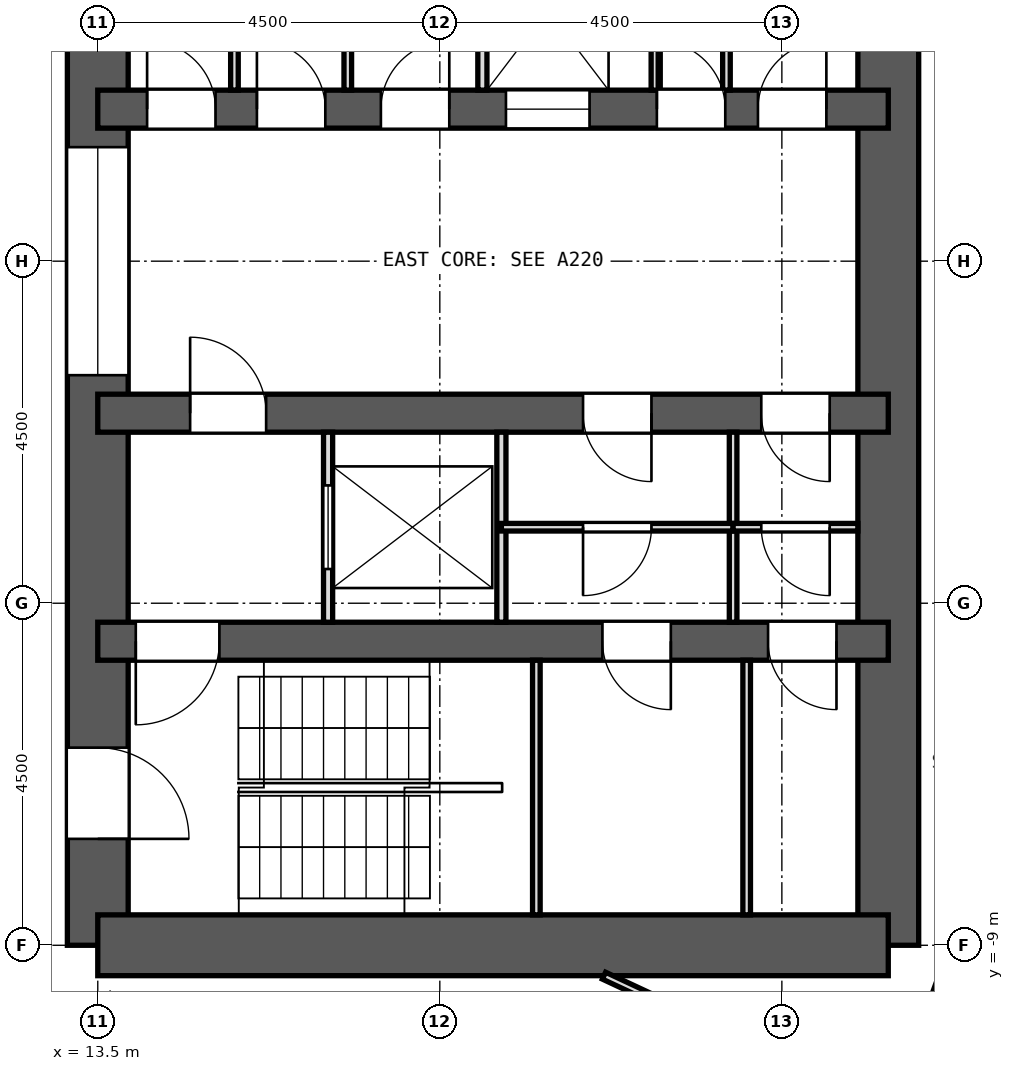
"""IFC4 building model, lengths in metres.
Left out: names, types, materials, properties, quantities, classifications, styles, units other than length and angle.
Written with IfcOpenShell. Run it as: python <this file> out.ifc"""

import sys

from ifc_helpers import new_model, si_unit, direction, frame, frame_2d, origin, place, context, subcontext, project, spatial, rectangle, extrude, element, fill, save


model = new_model("IFC4")
c1 = context("Model", 3, precision=1e-05, world=origin(), true_north=direction((0.0, 1.0)))
c2 = subcontext(c1, "Body", "Model", "MODEL_VIEW")
j1 = project(units=[si_unit("LENGTHUNIT", "METRE"), si_unit("PLANEANGLEUNIT", "RADIAN")], contexts=[c1])
p1 = place(None, origin())
s1 = spatial("IfcSite", under=j1, at=p1, CompositionType="ELEMENT")
p2 = place(p1, origin())
s2 = spatial("IfcBuilding", under=s1, at=p2, CompositionType="ELEMENT")
p3 = place(p2, frame((0.0, 0.0, 121.6)))
s3 = spatial("IfcBuildingStorey", under=s2, at=p3, CompositionType="ELEMENT", Elevation=121.6)
p4 = place(p3, frame((13.5, -9.0, 0.0), z_axis=(0.0, 0.0, 1.0), x_axis=(0.0, 1.0, 0.0)))
e1 = element("IfcWall", 1, at=p4, inside=s3, PredefinedType="SHEAR", context=c2, shape_type="SweptSolid", body=[
    extrude(rectangle(XDim=18.0, YDim=0.8, at=frame_2d((9.0, 0.0))), origin(), (0.0, 0.0, 1.0), 3.3),
])
p5 = place(p4, frame((15.4, 0.0, 0.0)))
e2 = element("IfcOpeningElement", 2, at=p5, cuts=e1, PredefinedType="OPENING", context=c2, shape_type="SweptSolid", body=[
    extrude(rectangle(XDim=1.2, YDim=2.1, at=frame_2d((0.6, 1.05))), frame((0.0, 0.412, 0.0), z_axis=(0.0, -1.0, 0.0), x_axis=(1.0, 0.0, 0.0)), (0.0, 0.0, 1.0), 0.824),
])
p6 = place(p4, frame((1.4, 0.0, 0.0)))
e3 = element("IfcOpeningElement", 3, at=p6, cuts=e1, PredefinedType="OPENING", context=c2, shape_type="SweptSolid", body=[
    extrude(rectangle(XDim=1.2, YDim=2.1, at=frame_2d((0.6, 1.05))), frame((0.0, 0.412, 0.0), z_axis=(0.0, -1.0, 0.0), x_axis=(1.0, 0.0, 0.0)), (0.0, 0.0, 1.0), 0.824),
])
p7 = place(p4, frame((7.5, 0.0, 0.0)))
e4 = element("IfcOpeningElement", 4, at=p7, cuts=e1, PredefinedType="OPENING", context=c2, shape_type="SweptSolid", body=[
    extrude(rectangle(XDim=3.0, YDim=2.4, at=frame_2d((1.5, 1.2))), frame((0.0, 0.412, 0.0), z_axis=(0.0, -1.0, 0.0), x_axis=(1.0, 0.0, 0.0)), (0.0, 0.0, 1.0), 0.824),
])
p8 = place(p3, frame((23.9, -9.0, 0.0), z_axis=(0.0, 0.0, 1.0), x_axis=(0.0, 1.0, 0.0)))
e5 = element("IfcWall", 5, at=p8, inside=s3, PredefinedType="SHEAR", context=c2, shape_type="SweptSolid", body=[
    extrude(rectangle(XDim=18.0, YDim=0.8, at=frame_2d((9.0, 0.0))), origin(), (0.0, 0.0, 1.0), 3.3),
])
p9 = place(p3, frame((13.5, -9.0, 0.0), z_axis=(0.0, 0.0, 1.0), x_axis=(1.0, 0.0, 0.0)))
e6 = element("IfcWall", 6, at=p9, inside=s3, PredefinedType="SHEAR", context=c2, shape_type="SweptSolid", body=[
    extrude(rectangle(XDim=10.4, YDim=0.8, at=frame_2d((5.2, 0.0))), origin(), (0.0, 0.0, 1.0), 3.3),
])
p10 = place(p3, frame((13.5, -5.0, 0.0), z_axis=(0.0, 0.0, 1.0), x_axis=(1.0, 0.0, 0.0)))
e7 = element("IfcWall", 7, at=p10, inside=s3, PredefinedType="SHEAR", context=c2, shape_type="SweptSolid", body=[
    extrude(rectangle(XDim=10.4, YDim=0.5, at=frame_2d((5.2, 0.0))), origin(), (0.0, 0.0, 1.0), 3.3),
])
p11 = place(p10, frame((6.639, 0.0, 0.0)))
e8 = element("IfcOpeningElement", 8, at=p11, cuts=e7, PredefinedType="OPENING", context=c2, shape_type="SweptSolid", body=[
    extrude(rectangle(XDim=0.9, YDim=2.1, at=frame_2d((0.45, 1.05))), frame((0.0, 0.262, 0.0), z_axis=(0.0, -1.0, 0.0), x_axis=(1.0, 0.0, 0.0)), (0.0, 0.0, 1.0), 0.524),
])
p12 = place(p10, frame((8.819, 0.0, 0.0)))
e9 = element("IfcOpeningElement", 9, at=p12, cuts=e7, PredefinedType="OPENING", context=c2, shape_type="SweptSolid", body=[
    extrude(rectangle(XDim=0.9, YDim=2.1, at=frame_2d((0.45, 1.05))), frame((0.0, 0.262, 0.0), z_axis=(0.0, -1.0, 0.0), x_axis=(1.0, 0.0, 0.0)), (0.0, 0.0, 1.0), 0.524),
])
p13 = place(p10, frame((0.5, 0.0, 0.0)))
e10 = element("IfcOpeningElement", 10, at=p13, cuts=e7, PredefinedType="OPENING", context=c2, shape_type="SweptSolid", body=[
    extrude(rectangle(XDim=1.1, YDim=2.1, at=frame_2d((0.55, 1.05))), frame((0.0, 0.262, 0.0), z_axis=(0.0, -1.0, 0.0), x_axis=(1.0, 0.0, 0.0)), (0.0, 0.0, 1.0), 0.524),
])
p14 = place(p3, frame((13.5, 2.0, 0.0), z_axis=(0.0, 0.0, 1.0), x_axis=(1.0, 0.0, 0.0)))
e11 = element("IfcWall", 11, at=p14, inside=s3, PredefinedType="SHEAR", context=c2, shape_type="SweptSolid", body=[
    extrude(rectangle(XDim=10.4, YDim=0.5, at=frame_2d((5.2, 0.0))), origin(), (0.0, 0.0, 1.0), 3.3),
])
p15 = place(p14, frame((5.37, 0.0, 0.0)))
e12 = element("IfcOpeningElement", 12, at=p15, cuts=e11, PredefinedType="OPENING", context=c2, shape_type="SweptSolid", body=[
    extrude(rectangle(XDim=1.1, YDim=2.1, at=frame_2d((0.55, 1.05))), frame((0.0, 0.262, 0.0), z_axis=(0.0, -1.0, 0.0), x_axis=(1.0, 0.0, 0.0)), (0.0, 0.0, 1.0), 0.524),
])
p16 = place(p14, frame((0.649, 0.0, 0.0)))
e13 = element("IfcOpeningElement", 13, at=p16, cuts=e11, PredefinedType="OPENING", context=c2, shape_type="SweptSolid", body=[
    extrude(rectangle(XDim=0.9, YDim=2.1, at=frame_2d((0.45, 1.05))), frame((0.0, 0.262, 0.0), z_axis=(0.0, -1.0, 0.0), x_axis=(1.0, 0.0, 0.0)), (0.0, 0.0, 1.0), 0.524),
])
p17 = place(p14, frame((2.094, 0.0, 0.0)))
e14 = element("IfcOpeningElement", 14, at=p17, cuts=e11, PredefinedType="OPENING", context=c2, shape_type="SweptSolid", body=[
    extrude(rectangle(XDim=0.9, YDim=2.1, at=frame_2d((0.45, 1.05))), frame((0.0, 0.262, 0.0), z_axis=(0.0, -1.0, 0.0), x_axis=(1.0, 0.0, 0.0)), (0.0, 0.0, 1.0), 0.524),
])
p18 = place(p14, frame((3.725, 0.0, 0.0)))
e15 = element("IfcOpeningElement", 15, at=p18, cuts=e11, PredefinedType="OPENING", context=c2, shape_type="SweptSolid", body=[
    extrude(rectangle(XDim=0.9, YDim=2.1, at=frame_2d((0.45, 1.05))), frame((0.0, 0.262, 0.0), z_axis=(0.0, -1.0, 0.0), x_axis=(1.0, 0.0, 0.0)), (0.0, 0.0, 1.0), 0.524),
])
p19 = place(p14, frame((7.355, 0.0, 0.0)))
e16 = element("IfcOpeningElement", 16, at=p19, cuts=e11, PredefinedType="OPENING", context=c2, shape_type="SweptSolid", body=[
    extrude(rectangle(XDim=0.9, YDim=2.1, at=frame_2d((0.45, 1.05))), frame((0.0, 0.262, 0.0), z_axis=(0.0, -1.0, 0.0), x_axis=(1.0, 0.0, 0.0)), (0.0, 0.0, 1.0), 0.524),
])
p20 = place(p14, frame((8.686, 0.0, 0.0)))
e17 = element("IfcOpeningElement", 17, at=p20, cuts=e11, PredefinedType="OPENING", context=c2, shape_type="SweptSolid", body=[
    extrude(rectangle(XDim=0.9, YDim=2.1, at=frame_2d((0.45, 1.05))), frame((0.0, 0.262, 0.0), z_axis=(0.0, -1.0, 0.0), x_axis=(1.0, 0.0, 0.0)), (0.0, 0.0, 1.0), 0.524),
])
p21 = place(p3, frame((13.5, -2.0, 0.0), z_axis=(0.0, 0.0, 1.0), x_axis=(1.0, 0.0, 0.0)))
e18 = element("IfcWall", 18, at=p21, inside=s3, PredefinedType="SHEAR", context=c2, shape_type="SweptSolid", body=[
    extrude(rectangle(XDim=10.4, YDim=0.5, at=frame_2d((5.2, 0.0))), origin(), (0.0, 0.0, 1.0), 3.3),
])
p22 = place(p21, frame((1.215, 0.0, 0.0)))
e19 = element("IfcOpeningElement", 19, at=p22, cuts=e18, PredefinedType="OPENING", context=c2, shape_type="SweptSolid", body=[
    extrude(rectangle(XDim=1.0, YDim=2.1, at=frame_2d((0.5, 1.05))), frame((0.0, 0.262, 0.0), z_axis=(0.0, -1.0, 0.0), x_axis=(1.0, 0.0, 0.0)), (0.0, 0.0, 1.0), 0.524),
])
p23 = place(p21, frame((6.384, 0.0, 0.0)))
e20 = element("IfcOpeningElement", 20, at=p23, cuts=e18, PredefinedType="OPENING", context=c2, shape_type="SweptSolid", body=[
    extrude(rectangle(XDim=0.9, YDim=2.1, at=frame_2d((0.45, 1.05))), frame((0.0, 0.262, 0.0), z_axis=(0.0, -1.0, 0.0), x_axis=(1.0, 0.0, 0.0)), (0.0, 0.0, 1.0), 0.524),
])
p24 = place(p21, frame((8.729, 0.0, 0.0)))
e21 = element("IfcOpeningElement", 21, at=p24, cuts=e18, PredefinedType="OPENING", context=c2, shape_type="SweptSolid", body=[
    extrude(rectangle(XDim=0.9, YDim=2.1, at=frame_2d((0.45, 1.05))), frame((0.0, 0.262, 0.0), z_axis=(0.0, -1.0, 0.0), x_axis=(1.0, 0.0, 0.0)), (0.0, 0.0, 1.0), 0.524),
])
p25 = place(p3, frame((24.369, -10.811, 0.0), z_axis=(0.0, 0.0, 1.0), x_axis=(0.341990236633, 0.939703505393, 0.0)))
e22 = element("IfcWall", 22, at=p25, inside=s3, PredefinedType="SOLIDWALL", context=c2, shape_type="SweptSolid", body=[
    extrude(rectangle(XDim=3.648, YDim=0.6, at=frame_2d((1.824, 0.0))), origin(), (0.0, 0.0, 1.0), 2.8),
])
p26 = place(p3, frame((20.16, -9.4, 0.0), z_axis=(0.0, 0.0, 1.0), x_axis=(0.906121146584, -0.423018282954, 0.0)))
e23 = element("IfcWall", 23, at=p26, inside=s3, PredefinedType="PARTITIONING", context=c2, shape_type="SweptSolid", body=[
    extrude(rectangle(XDim=3.421, YDim=0.1, at=frame_2d((1.711, 0.0))), origin(), (0.0, 0.0, 1.0), 2.8),
])
for number, where, z_axis, x_axis in (
    (24, (15.298, 2.25, 0.0), (0.0, 0.0, 1.0), (0.0, 1.0, 0.0)),
    (25, (16.789, 2.25, 0.0), (0.0, 0.0, 1.0), (0.0, 1.0, 0.0)),
):
    element("IfcWall", number, at=place(p3, frame(where, z_axis=z_axis, x_axis=x_axis)), inside=s3, PredefinedType="PARTITIONING", context=c2, shape_type="SweptSolid", body=[
        extrude(rectangle(XDim=2.5, YDim=0.1, at=frame_2d((1.25, 0.0))), origin(), (0.0, 0.0, 1.0), 2.8),
    ])
for number, where, z_axis, x_axis in (
    (26, (18.56, 2.25, 0.0), (0.0, 0.0, 1.0), (0.0, 1.0, 0.0)),
    (27, (20.84, 2.25, 0.0), (0.0, 0.0, 1.0), (0.0, 1.0, 0.0)),
):
    element("IfcWall", number, at=place(p3, frame(where, z_axis=z_axis, x_axis=x_axis)), inside=s3, PredefinedType="PARTITIONING", context=c2, shape_type="SweptSolid", body=[
        extrude(rectangle(XDim=2.5, YDim=0.12, at=frame_2d((1.25, 0.0))), origin(), (0.0, 0.0, 1.0), 2.8),
    ])
p27 = place(p3, frame((21.771, 2.25, 0.0), z_axis=(0.0, 0.0, 1.0), x_axis=(0.0, 1.0, 0.0)))
e28 = element("IfcWall", 28, at=p27, inside=s3, PredefinedType="PARTITIONING", context=c2, shape_type="SweptSolid", body=[
    extrude(rectangle(XDim=2.5, YDim=0.1, at=frame_2d((1.25, 0.0))), origin(), (0.0, 0.0, 1.0), 2.8),
])
p28 = place(p3, frame((16.53, -4.75, 0.0), z_axis=(0.0, 0.0, 1.0), x_axis=(0.0, 1.0, 0.0)))
e29 = element("IfcWall", 29, at=p28, inside=s3, PredefinedType="PARTITIONING", context=c2, shape_type="SweptSolid", body=[
    extrude(rectangle(XDim=2.5, YDim=0.12, at=frame_2d((1.25, 0.0))), origin(), (0.0, 0.0, 1.0), 2.8),
])
p29 = place(p28, frame((0.7, 0.0, 0.0)))
e30 = element("IfcOpeningElement", 30, at=p29, cuts=e29, PredefinedType="OPENING", context=c2, shape_type="SweptSolid", body=[
    extrude(rectangle(XDim=1.1, YDim=2.1, at=frame_2d((0.55, 1.05))), frame((0.0, 0.072, 0.0), z_axis=(0.0, -1.0, 0.0), x_axis=(1.0, 0.0, 0.0)), (0.0, 0.0, 1.0), 0.144),
])
p30 = place(p3, frame((18.81, -4.75, 0.0), z_axis=(0.0, 0.0, 1.0), x_axis=(0.0, 1.0, 0.0)))
e31 = element("IfcWall", 31, at=p30, inside=s3, PredefinedType="PARTITIONING", context=c2, shape_type="SweptSolid", body=[
    extrude(rectangle(XDim=2.5, YDim=0.12, at=frame_2d((1.25, 0.0))), origin(), (0.0, 0.0, 1.0), 2.8),
])
p31 = place(p3, frame((21.858, -4.75, 0.0), z_axis=(0.0, 0.0, 1.0), x_axis=(0.0, 1.0, 0.0)))
e32 = element("IfcWall", 32, at=p31, inside=s3, PredefinedType="PARTITIONING", context=c2, shape_type="SweptSolid", body=[
    extrude(rectangle(XDim=2.5, YDim=0.1, at=frame_2d((1.25, 0.0))), origin(), (0.0, 0.0, 1.0), 2.8),
])
p32 = place(p3, frame((18.81, -3.5, 0.0), z_axis=(0.0, 0.0, 1.0), x_axis=(1.0, 0.0, 0.0)))
e33 = element("IfcWall", 33, at=p32, inside=s3, PredefinedType="PARTITIONING", context=c2, shape_type="SweptSolid", body=[
    extrude(rectangle(XDim=3.048, YDim=0.1, at=frame_2d((1.524, 0.0))), origin(), (0.0, 0.0, 1.0), 2.8),
])
p33 = place(p32, frame((1.074, 0.0, 0.0)))
e34 = element("IfcOpeningElement", 34, at=p33, cuts=e33, PredefinedType="OPENING", context=c2, shape_type="SweptSolid", body=[
    extrude(rectangle(XDim=0.9, YDim=2.1, at=frame_2d((0.45, 1.05))), frame((0.0, 0.062, 0.0), z_axis=(0.0, -1.0, 0.0), x_axis=(1.0, 0.0, 0.0)), (0.0, 0.0, 1.0), 0.124),
])
p34 = place(p3, frame((21.858, -3.5, 0.0), z_axis=(0.0, 0.0, 1.0), x_axis=(1.0, 0.0, 0.0)))
e35 = element("IfcWall", 35, at=p34, inside=s3, PredefinedType="PARTITIONING", context=c2, shape_type="SweptSolid", body=[
    extrude(rectangle(XDim=1.642, YDim=0.1, at=frame_2d((0.821, 0.0))), origin(), (0.0, 0.0, 1.0), 2.8),
])
p35 = place(p34, frame((0.371, 0.0, 0.0)))
e36 = element("IfcOpeningElement", 36, at=p35, cuts=e35, PredefinedType="OPENING", context=c2, shape_type="SweptSolid", body=[
    extrude(rectangle(XDim=0.9, YDim=2.1, at=frame_2d((0.45, 1.05))), frame((0.0, 0.062, 0.0), z_axis=(0.0, -1.0, 0.0), x_axis=(1.0, 0.0, 0.0)), (0.0, 0.0, 1.0), 0.124),
])
for number, where, z_axis, x_axis in (
    (37, (19.27, -8.6, 0.0), (0.0, 0.0, 1.0), (0.0, 1.0, 0.0)),
    (38, (22.037, -8.6, 0.0), (0.0, 0.0, 1.0), (0.0, 1.0, 0.0)),
):
    element("IfcWall", number, at=place(p3, frame(where, z_axis=z_axis, x_axis=x_axis)), inside=s3, PredefinedType="PARTITIONING", context=c2, shape_type="SweptSolid", body=[
        extrude(rectangle(XDim=3.35, YDim=0.1, at=frame_2d((1.675, 0.0))), origin(), (0.0, 0.0, 1.0), 2.8),
    ])
p36 = place(p15, origin())
e39 = element("IfcDoor", 39, at=p36, inside=s3, OperationType="DOUBLE_DOOR_SLIDING", PredefinedType="DOOR", context=c2, shape_type="SweptSolid", body=[
    extrude(rectangle(XDim=1.1, YDim=2.1, at=frame_2d((0.55, 1.05))), frame((0.0, 0.025, 0.0), z_axis=(0.0, -1.0, 0.0), x_axis=(1.0, 0.0, 0.0)), (0.0, 0.0, 1.0), 0.05),
])
fill(e12, e39)
p37 = place(p29, origin())
e40 = element("IfcDoor", 40, at=p37, inside=s3, OperationType="DOUBLE_DOOR_SLIDING", PredefinedType="DOOR", context=c2, shape_type="SweptSolid", body=[
    extrude(rectangle(XDim=1.1, YDim=2.1, at=frame_2d((0.55, 1.05))), frame((0.0, 0.025, 0.0), z_axis=(0.0, -1.0, 0.0), x_axis=(1.0, 0.0, 0.0)), (0.0, 0.0, 1.0), 0.05),
])
fill(e30, e40)
p38 = place(p16, origin())
e41 = element("IfcDoor", 41, at=p38, inside=s3, OperationType="SINGLE_SWING_LEFT", PredefinedType="DOOR", context=c2, shape_type="SweptSolid", body=[
    extrude(rectangle(XDim=0.9, YDim=2.1, at=frame_2d((0.45, 1.05))), frame((0.0, 0.025, 0.0), z_axis=(0.0, -1.0, 0.0), x_axis=(1.0, 0.0, 0.0)), (0.0, 0.0, 1.0), 0.05),
])
fill(e13, e41)
p39 = place(p17, origin())
e42 = element("IfcDoor", 42, at=p39, inside=s3, OperationType="SINGLE_SWING_LEFT", PredefinedType="DOOR", context=c2, shape_type="SweptSolid", body=[
    extrude(rectangle(XDim=0.9, YDim=2.1, at=frame_2d((0.45, 1.05))), frame((0.0, 0.025, 0.0), z_axis=(0.0, -1.0, 0.0), x_axis=(1.0, 0.0, 0.0)), (0.0, 0.0, 1.0), 0.05),
])
fill(e14, e42)
p40 = place(p18, origin())
e43 = element("IfcDoor", 43, at=p40, inside=s3, OperationType="SINGLE_SWING_RIGHT", PredefinedType="DOOR", context=c2, shape_type="SweptSolid", body=[
    extrude(rectangle(XDim=0.9, YDim=2.1, at=frame_2d((0.45, 1.05))), frame((0.0, 0.025, 0.0), z_axis=(0.0, -1.0, 0.0), x_axis=(1.0, 0.0, 0.0)), (0.0, 0.0, 1.0), 0.05),
])
fill(e15, e43)
p41 = place(p19, origin())
e44 = element("IfcDoor", 44, at=p41, inside=s3, OperationType="SINGLE_SWING_LEFT", PredefinedType="DOOR", context=c2, shape_type="SweptSolid", body=[
    extrude(rectangle(XDim=0.9, YDim=2.1, at=frame_2d((0.45, 1.05))), frame((0.0, 0.025, 0.0), z_axis=(0.0, -1.0, 0.0), x_axis=(1.0, 0.0, 0.0)), (0.0, 0.0, 1.0), 0.05),
])
fill(e16, e44)
p42 = place(p20, origin())
e45 = element("IfcDoor", 45, at=p42, inside=s3, OperationType="SINGLE_SWING_RIGHT", PredefinedType="DOOR", context=c2, shape_type="SweptSolid", body=[
    extrude(rectangle(XDim=0.9, YDim=2.1, at=frame_2d((0.45, 1.05))), frame((0.0, 0.025, 0.0), z_axis=(0.0, -1.0, 0.0), x_axis=(1.0, 0.0, 0.0)), (0.0, 0.0, 1.0), 0.05),
])
fill(e17, e45)
p43 = place(p22, origin())
e46 = element("IfcDoor", 46, at=p43, inside=s3, OperationType="SINGLE_SWING_LEFT", PredefinedType="DOOR", context=c2, shape_type="SweptSolid", body=[
    extrude(rectangle(XDim=1.0, YDim=2.1, at=frame_2d((0.5, 1.05))), frame((0.0, 0.025, 0.0), z_axis=(0.0, -1.0, 0.0), x_axis=(1.0, 0.0, 0.0)), (0.0, 0.0, 1.0), 0.05),
])
fill(e19, e46)
p44 = place(p23, frame((0.9, 0.0, 0.0), z_axis=(0.0, 0.0, 1.0), x_axis=(-1.0, 0.0, 0.0)))
e47 = element("IfcDoor", 47, at=p44, inside=s3, OperationType="SINGLE_SWING_LEFT", PredefinedType="DOOR", context=c2, shape_type="SweptSolid", body=[
    extrude(rectangle(XDim=0.9, YDim=2.1, at=frame_2d((0.45, 1.05))), frame((0.0, 0.025, 0.0), z_axis=(0.0, -1.0, 0.0), x_axis=(1.0, 0.0, 0.0)), (0.0, 0.0, 1.0), 0.05),
])
fill(e20, e47)
p45 = place(p24, frame((0.9, 0.0, 0.0), z_axis=(0.0, 0.0, 1.0), x_axis=(-1.0, 0.0, 0.0)))
e48 = element("IfcDoor", 48, at=p45, inside=s3, OperationType="SINGLE_SWING_LEFT", PredefinedType="DOOR", context=c2, shape_type="SweptSolid", body=[
    extrude(rectangle(XDim=0.9, YDim=2.1, at=frame_2d((0.45, 1.05))), frame((0.0, 0.025, 0.0), z_axis=(0.0, -1.0, 0.0), x_axis=(1.0, 0.0, 0.0)), (0.0, 0.0, 1.0), 0.05),
])
fill(e21, e48)
p46 = place(p35, frame((0.9, 0.0, 0.0), z_axis=(0.0, 0.0, 1.0), x_axis=(-1.0, 0.0, 0.0)))
e49 = element("IfcDoor", 49, at=p46, inside=s3, OperationType="SINGLE_SWING_LEFT", PredefinedType="DOOR", context=c2, shape_type="SweptSolid", body=[
    extrude(rectangle(XDim=0.9, YDim=2.1, at=frame_2d((0.45, 1.05))), frame((0.0, 0.025, 0.0), z_axis=(0.0, -1.0, 0.0), x_axis=(1.0, 0.0, 0.0)), (0.0, 0.0, 1.0), 0.05),
])
fill(e36, e49)
p47 = place(p33, frame((0.9, 0.0, 0.0), z_axis=(0.0, 0.0, 1.0), x_axis=(-1.0, 0.0, 0.0)))
e50 = element("IfcDoor", 50, at=p47, inside=s3, OperationType="SINGLE_SWING_RIGHT", PredefinedType="DOOR", context=c2, shape_type="SweptSolid", body=[
    extrude(rectangle(XDim=0.9, YDim=2.1, at=frame_2d((0.45, 1.05))), frame((0.0, 0.025, 0.0), z_axis=(0.0, -1.0, 0.0), x_axis=(1.0, 0.0, 0.0)), (0.0, 0.0, 1.0), 0.05),
])
fill(e34, e50)
p48 = place(p11, frame((0.9, 0.0, 0.0), z_axis=(0.0, 0.0, 1.0), x_axis=(-1.0, 0.0, 0.0)))
e51 = element("IfcDoor", 51, at=p48, inside=s3, OperationType="SINGLE_SWING_LEFT", PredefinedType="DOOR", context=c2, shape_type="SweptSolid", body=[
    extrude(rectangle(XDim=0.9, YDim=2.1, at=frame_2d((0.45, 1.05))), frame((0.0, 0.025, 0.0), z_axis=(0.0, -1.0, 0.0), x_axis=(1.0, 0.0, 0.0)), (0.0, 0.0, 1.0), 0.05),
])
fill(e8, e51)
p49 = place(p12, frame((0.9, 0.0, 0.0), z_axis=(0.0, 0.0, 1.0), x_axis=(-1.0, 0.0, 0.0)))
e52 = element("IfcDoor", 52, at=p49, inside=s3, OperationType="SINGLE_SWING_LEFT", PredefinedType="DOOR", context=c2, shape_type="SweptSolid", body=[
    extrude(rectangle(XDim=0.9, YDim=2.1, at=frame_2d((0.45, 1.05))), frame((0.0, 0.025, 0.0), z_axis=(0.0, -1.0, 0.0), x_axis=(1.0, 0.0, 0.0)), (0.0, 0.0, 1.0), 0.05),
])
fill(e9, e52)
p50 = place(p13, frame((1.1, 0.0, 0.0), z_axis=(0.0, 0.0, 1.0), x_axis=(-1.0, 0.0, 0.0)))
e53 = element("IfcDoor", 53, at=p50, inside=s3, OperationType="SINGLE_SWING_RIGHT", PredefinedType="DOOR", context=c2, shape_type="SweptSolid", body=[
    extrude(rectangle(XDim=1.1, YDim=2.1, at=frame_2d((0.55, 1.05))), frame((0.0, 0.025, 0.0), z_axis=(0.0, -1.0, 0.0), x_axis=(1.0, 0.0, 0.0)), (0.0, 0.0, 1.0), 0.05),
])
fill(e10, e53)
p51 = place(p6, frame((1.2, 0.0, 0.0), z_axis=(0.0, 0.0, 1.0), x_axis=(-1.0, 0.0, 0.0)))
e54 = element("IfcDoor", 54, at=p51, inside=s3, OperationType="SINGLE_SWING_RIGHT", PredefinedType="DOOR", context=c2, shape_type="SweptSolid", body=[
    extrude(rectangle(XDim=1.2, YDim=2.1, at=frame_2d((0.6, 1.05))), frame((0.0, 0.025, 0.0), z_axis=(0.0, -1.0, 0.0), x_axis=(1.0, 0.0, 0.0)), (0.0, 0.0, 1.0), 0.05),
])
fill(e3, e54)
p52 = place(p7, origin())
e55 = element("IfcDoor", 55, at=p52, inside=s3, OperationType="DOUBLE_DOOR_SLIDING", PredefinedType="DOOR", context=c2, shape_type="SweptSolid", body=[
    extrude(rectangle(XDim=3.0, YDim=2.4, at=frame_2d((1.5, 1.2))), frame((0.0, 0.025, 0.0), z_axis=(0.0, -1.0, 0.0), x_axis=(1.0, 0.0, 0.0)), (0.0, 0.0, 1.0), 0.05),
])
fill(e4, e55)
save(model, sys.argv[1])
